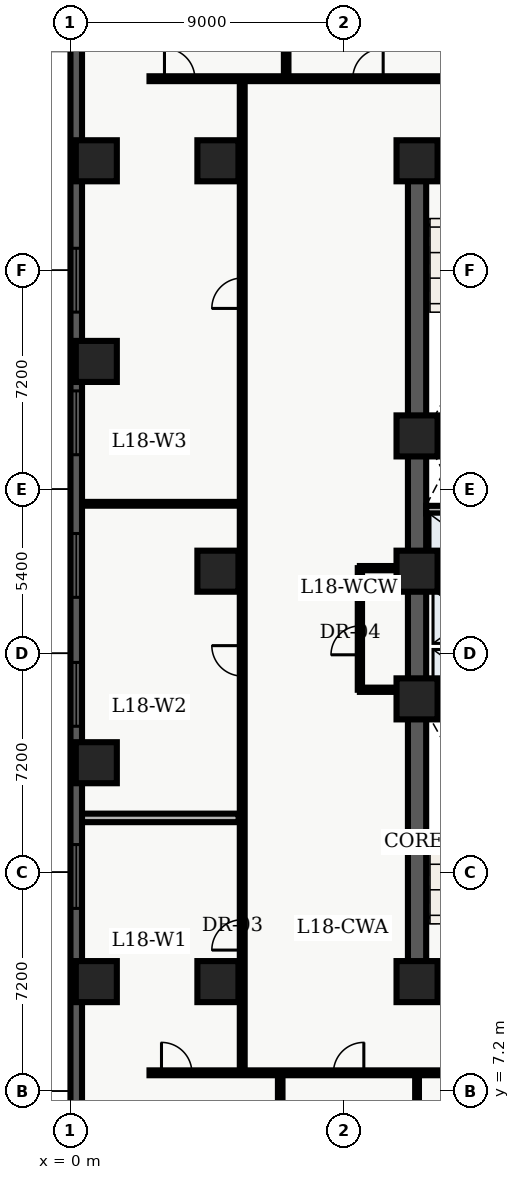
"""IFC4 building model, lengths in metres.
Left out: names, types, materials, properties, quantities, classifications, styles, units other than length and angle.
Written with IfcOpenShell. Run it as: python <this file> out.ifc"""

import sys

from ifc_helpers import new_model, entity, si_unit, converted_unit, direction, frame, origin_with_axes, origin_2d_with_axis, place, context, subcontext, project, spatial, polyline, rectangle, outline, extrude, element, fill, save


model = new_model("IFC4")
c1 = context("Model", 3, precision=1e-05, world=origin_with_axes(), true_north=direction((0.0, 1.0)))
c2 = subcontext(c1, "Body", "Model", "MODEL_VIEW")
j1 = project(units=[si_unit("LENGTHUNIT", "METRE"), converted_unit("PLANEANGLEUNIT", "DEGREE", entity("IfcPlaneAngleMeasure", 0.017), si_unit("PLANEANGLEUNIT", "RADIAN"), dimensions=[0, 0, 0, 0, 0, 0, 0])], contexts=[c1])
p1 = place(None, origin_with_axes())
s1 = spatial("IfcSite", under=j1, at=p1, CompositionType="ELEMENT")
p2 = place(p1, origin_with_axes())
s2 = spatial("IfcBuilding", under=s1, at=p2, CompositionType="ELEMENT")
p3 = place(p2, frame((0.0, 0.0, 75.6), z_axis=(0.0, 0.0, 1.0), x_axis=(1.0, 0.0, 0.0)))
s3 = spatial("IfcBuildingStorey", under=s2, at=p3, CompositionType="ELEMENT", Elevation=75.6)
p4 = place(p3, frame((11.4, 10.8, 0.0), z_axis=(0.0, 0.0, 1.0), x_axis=(0.0, 1.0, 0.0)))
e1 = element("IfcWall", 1, at=p4, inside=s3, PredefinedType="SHEAR", context=c2, shape_type="SweptSolid", body=[
    extrude(outline(polyline([(0.0, -0.3), (27.0, -0.3), (27.0, 0.3), (0.0, 0.3), (0.0, -0.3)])), origin_with_axes(), (0.0, 0.0, 1.0), 3.6),
])
p5 = place(p3, frame((11.4, 10.8, 0.0), z_axis=(0.0, 0.0, 1.0), x_axis=(1.0, 0.0, 0.0)))
e2 = element("IfcWall", 2, at=p5, inside=s3, PredefinedType="SHEAR", context=c2, shape_type="SweptSolid", body=[
    extrude(outline(polyline([(0.0, -0.3), (7.2, -0.3), (7.2, 0.3), (0.0, 0.3), (0.0, -0.3)])), origin_with_axes(), (0.0, 0.0, 1.0), 3.6),
])
p6 = place(p5, frame((2.625, 0.0, 0.0), z_axis=(0.0, 0.0, 1.0), x_axis=(1.0, 0.0, 0.0)))
e3 = element("IfcOpeningElement", 3, at=p6, cuts=e2, PredefinedType="OPENING", context=c2, shape_type="SweptSolid", body=[
    extrude(rectangle(XDim=1.05, YDim=0.62, at=origin_2d_with_axis()), origin_with_axes(), (0.0, 0.0, 1.0), 2.15),
])
p7 = place(p3, frame((11.4, 37.8, 0.0), z_axis=(0.0, 0.0, 1.0), x_axis=(1.0, 0.0, 0.0)))
e4 = element("IfcWall", 4, at=p7, inside=s3, PredefinedType="SHEAR", context=c2, shape_type="SweptSolid", body=[
    extrude(outline(polyline([(0.0, -0.3), (7.2, -0.3), (7.2, 0.3), (0.0, 0.3), (0.0, -0.3)])), origin_with_axes(), (0.0, 0.0, 1.0), 3.6),
])
p8 = place(p7, frame((2.625, 0.0, 0.0), z_axis=(0.0, 0.0, 1.0), x_axis=(1.0, 0.0, 0.0)))
e5 = element("IfcOpeningElement", 5, at=p8, cuts=e4, PredefinedType="OPENING", context=c2, shape_type="SweptSolid", body=[
    extrude(rectangle(XDim=1.05, YDim=0.62, at=origin_2d_with_axis()), origin_with_axes(), (0.0, 0.0, 1.0), 2.15),
])
for number, where, z_axis, x_axis in (
    (6, (11.7, 19.825, 0.0), (0.0, 0.0, 1.0), (1.0, 0.0, 0.0)),
    (7, (11.7, 28.775, 0.0), (0.0, 0.0, 1.0), (1.0, 0.0, 0.0)),
):
    element("IfcWall", number, at=place(p3, frame(where, z_axis=z_axis, x_axis=x_axis)), inside=s3, PredefinedType="SHEAR", context=c2, shape_type="SweptSolid", body=[
        extrude(outline(polyline([(0.0, -0.125), (6.6, -0.125), (6.6, 0.125), (0.0, 0.125), (0.0, -0.125)])), origin_with_axes(), (0.0, 0.0, 1.0), 3.6),
    ])
p9 = place(p3, frame((11.7, 24.1, 0.0), z_axis=(0.0, 0.0, 1.0), x_axis=(1.0, 0.0, 0.0)))
e8 = element("IfcWall", 8, at=p9, inside=s3, PredefinedType="SOLIDWALL", context=c2, shape_type="SweptSolid", body=[
    extrude(outline(polyline([(0.0, -0.125), (6.6, -0.125), (6.6, 0.125), (0.0, 0.125), (0.0, -0.125)])), origin_with_axes(), (0.0, 0.0, 1.0), 2.64),
])
p10 = place(p9, frame((3.6, 0.0, 0.0), z_axis=(0.0, 0.0, 1.0), x_axis=(1.0, 0.0, 0.0)))
e9 = element("IfcOpeningElement", 9, at=p10, cuts=e8, PredefinedType="OPENING", context=c2, shape_type="SweptSolid", body=[
    extrude(rectangle(XDim=0.9, YDim=0.27, at=origin_2d_with_axis()), origin_with_axes(), (0.0, 0.0, 1.0), 2.15),
])
p11 = place(p9, frame((5.65, 0.0, 0.0), z_axis=(0.0, 0.0, 1.0), x_axis=(1.0, 0.0, 0.0)))
e10 = element("IfcOpeningElement", 10, at=p11, cuts=e8, PredefinedType="OPENING", context=c2, shape_type="SweptSolid", body=[
    extrude(rectangle(XDim=0.9, YDim=0.27, at=origin_2d_with_axis()), origin_with_axes(), (0.0, 0.0, 1.0), 2.15),
])
p12 = place(p3, frame((11.7, 26.325, 0.0), z_axis=(0.0, 0.0, 1.0), x_axis=(1.0, 0.0, 0.0)))
e11 = element("IfcWall", 11, at=p12, inside=s3, PredefinedType="SOLIDWALL", context=c2, shape_type="SweptSolid", body=[
    extrude(outline(polyline([(0.0, -0.125), (6.6, -0.125), (6.6, 0.125), (0.0, 0.125), (0.0, -0.125)])), origin_with_axes(), (0.0, 0.0, 1.0), 2.64),
])
p13 = place(p12, frame((3.5, 0.0, 0.0), z_axis=(0.0, 0.0, 1.0), x_axis=(1.0, 0.0, 0.0)))
e12 = element("IfcOpeningElement", 12, at=p13, cuts=e11, PredefinedType="OPENING", context=c2, shape_type="SweptSolid", body=[
    extrude(rectangle(XDim=0.9, YDim=0.27, at=origin_2d_with_axis()), origin_with_axes(), (0.0, 0.0, 1.0), 2.15),
])
for number, where, z_axis, x_axis in (
    (13, (11.4, 10.8, 0.0), (0.0, 0.0, 1.0), (1.0, 0.0, 0.0)),
    (14, (11.4, 20.1, 0.0), (0.0, 0.0, 1.0), (1.0, 0.0, 0.0)),
    (15, (11.4, 24.3, 0.0), (0.0, 0.0, 1.0), (1.0, 0.0, 0.0)),
    (16, (11.4, 28.75, 0.0), (0.0, 0.0, 1.0), (1.0, 0.0, 0.0)),
    (17, (11.4, 37.8, 0.0), (0.0, 0.0, 1.0), (1.0, 0.0, 0.0)),
    (18, (4.85, 10.8, 0.0), (0.0, 0.0, 1.0), (1.0, 0.0, 0.0)),
    (19, (4.85, 24.3, 0.0), (0.0, 0.0, 1.0), (1.0, 0.0, 0.0)),
    (20, (4.85, 37.8, 0.0), (0.0, 0.0, 1.0), (1.0, 0.0, 0.0)),
    (21, (0.85, 10.8, 0.0), (0.0, 0.0, 1.0), (1.0, 0.0, 0.0)),
    (22, (0.85, 18.0, 0.0), (0.0, 0.0, 1.0), (1.0, 0.0, 0.0)),
    (23, (0.85, 31.2, 0.0), (0.0, 0.0, 1.0), (1.0, 0.0, 0.0)),
    (24, (0.85, 37.8, 0.0), (0.0, 0.0, 1.0), (1.0, 0.0, 0.0)),
):
    element("IfcColumn", number, at=place(p3, frame(where, z_axis=z_axis, x_axis=x_axis)), inside=s3, PredefinedType="COLUMN", context=c2, shape_type="SweptSolid", body=[
        extrude(rectangle(XDim=1.35, YDim=1.35, at=origin_2d_with_axis()), origin_with_axes(), (0.0, 0.0, 1.0), 3.9),
    ])
p14 = place(p3, frame((9.52, 20.4, 0.0), z_axis=(0.0, 0.0, 1.0), x_axis=(0.0, 1.0, 0.0)))
e25 = element("IfcWall", 25, at=p14, inside=s3, PredefinedType="PARTITIONING", context=c2, shape_type="SweptSolid", body=[
    extrude(outline(polyline([(0.0, -0.07), (4.0, -0.07), (4.0, 0.07), (0.0, 0.07), (0.0, -0.07)])), origin_with_axes(), (0.0, 0.0, 1.0), 2.64),
])
p15 = place(p14, frame((1.625, 0.0, 0.0), z_axis=(0.0, 0.0, 1.0), x_axis=(1.0, 0.0, 0.0)))
e26 = element("IfcOpeningElement", 26, at=p15, cuts=e25, PredefinedType="OPENING", context=c2, shape_type="SweptSolid", body=[
    extrude(rectangle(XDim=0.95, YDim=0.16, at=origin_2d_with_axis()), origin_with_axes(), (0.0, 0.0, 1.0), 2.15),
])
for number, where, z_axis, x_axis in (
    (27, (9.52, 20.4, 0.0), (0.0, 0.0, 1.0), (1.0, 0.0, 0.0)),
    (28, (9.52, 24.4, 0.0), (0.0, 0.0, 1.0), (1.0, 0.0, 0.0)),
):
    element("IfcWall", number, at=place(p3, frame(where, z_axis=z_axis, x_axis=x_axis)), inside=s3, PredefinedType="PARTITIONING", context=c2, shape_type="SweptSolid", body=[
        extrude(outline(polyline([(0.0, -0.07), (1.58, -0.07), (1.58, 0.07), (0.0, 0.07), (0.0, -0.07)])), origin_with_axes(), (0.0, 0.0, 1.0), 2.64),
    ])
p16 = place(p3, frame((2.6, 7.8, 0.0), z_axis=(0.0, 0.0, 1.0), x_axis=(1.0, 0.0, 0.0)))
e29 = element("IfcWall", 29, at=p16, inside=s3, PredefinedType="PARTITIONING", context=c2, shape_type="SweptSolid", body=[
    extrude(outline(polyline([(0.0, -0.08), (18.55, -0.08), (18.55, 0.08), (0.0, 0.08), (0.0, -0.08)])), origin_with_axes(), (0.0, 0.0, 1.0), 2.64),
])
p17 = place(p16, frame((0.894, 0.0, 0.0), z_axis=(0.0, 0.0, 1.0), x_axis=(1.0, 0.0, 0.0)))
e30 = element("IfcOpeningElement", 30, at=p17, cuts=e29, PredefinedType="OPENING", context=c2, shape_type="SweptSolid", body=[
    extrude(rectangle(XDim=1.0, YDim=0.18, at=origin_2d_with_axis()), origin_with_axes(), (0.0, 0.0, 1.0), 2.15),
])
p18 = place(p16, frame((6.55, 0.0, 0.0), z_axis=(0.0, 0.0, 1.0), x_axis=(1.0, 0.0, 0.0)))
e31 = element("IfcOpeningElement", 31, at=p18, cuts=e29, PredefinedType="OPENING", context=c2, shape_type="SweptSolid", body=[
    extrude(rectangle(XDim=1.0, YDim=0.18, at=origin_2d_with_axis()), origin_with_axes(), (0.0, 0.0, 1.0), 2.15),
])
p19 = place(p16, frame((11.932, 0.0, 0.0), z_axis=(0.0, 0.0, 1.0), x_axis=(1.0, 0.0, 0.0)))
e32 = element("IfcOpeningElement", 32, at=p19, cuts=e29, PredefinedType="OPENING", context=c2, shape_type="SweptSolid", body=[
    extrude(rectangle(XDim=1.0, YDim=0.18, at=origin_2d_with_axis()), origin_with_axes(), (0.0, 0.0, 1.0), 2.15),
])
p20 = place(p16, frame((16.502, 0.0, 0.0), z_axis=(0.0, 0.0, 1.0), x_axis=(1.0, 0.0, 0.0)))
e33 = element("IfcOpeningElement", 33, at=p20, cuts=e29, PredefinedType="OPENING", context=c2, shape_type="SweptSolid", body=[
    extrude(rectangle(XDim=1.0, YDim=0.18, at=origin_2d_with_axis()), origin_with_axes(), (0.0, 0.0, 1.0), 2.15),
])
p21 = place(p3, frame((2.6, 40.5, 0.0), z_axis=(0.0, 0.0, 1.0), x_axis=(1.0, 0.0, 0.0)))
e34 = element("IfcWall", 34, at=p21, inside=s3, PredefinedType="PARTITIONING", context=c2, shape_type="SweptSolid", body=[
    extrude(outline(polyline([(0.0, -0.08), (18.65, -0.08), (18.65, 0.08), (0.0, 0.08), (0.0, -0.08)])), origin_with_axes(), (0.0, 0.0, 1.0), 2.64),
])
p22 = place(p21, frame((0.992, 0.0, 0.0), z_axis=(0.0, 0.0, 1.0), x_axis=(1.0, 0.0, 0.0)))
e35 = element("IfcOpeningElement", 35, at=p22, cuts=e34, PredefinedType="OPENING", context=c2, shape_type="SweptSolid", body=[
    extrude(rectangle(XDim=1.0, YDim=0.18, at=origin_2d_with_axis()), origin_with_axes(), (0.0, 0.0, 1.0), 2.15),
])
p23 = place(p21, frame((7.186, 0.0, 0.0), z_axis=(0.0, 0.0, 1.0), x_axis=(1.0, 0.0, 0.0)))
e36 = element("IfcOpeningElement", 36, at=p23, cuts=e34, PredefinedType="OPENING", context=c2, shape_type="SweptSolid", body=[
    extrude(rectangle(XDim=1.0, YDim=0.18, at=origin_2d_with_axis()), origin_with_axes(), (0.0, 0.0, 1.0), 2.15),
])
p24 = place(p21, frame((13.148, 0.0, 0.0), z_axis=(0.0, 0.0, 1.0), x_axis=(1.0, 0.0, 0.0)))
e37 = element("IfcOpeningElement", 37, at=p24, cuts=e34, PredefinedType="OPENING", context=c2, shape_type="SweptSolid", body=[
    extrude(rectangle(XDim=1.0, YDim=0.18, at=origin_2d_with_axis()), origin_with_axes(), (0.0, 0.0, 1.0), 2.15),
])
p25 = place(p3, frame((5.65, 7.8, 0.0), z_axis=(0.0, 0.0, 1.0), x_axis=(0.0, 1.0, 0.0)))
e38 = element("IfcWall", 38, at=p25, inside=s3, PredefinedType="PARTITIONING", context=c2, shape_type="SweptSolid", body=[
    extrude(outline(polyline([(0.0, -0.08), (32.7, -0.08), (32.7, 0.08), (0.0, 0.08), (0.0, -0.08)])), origin_with_axes(), (0.0, 0.0, 1.0), 2.64),
])
p26 = place(p25, frame((4.537, 0.0, 0.0), z_axis=(0.0, 0.0, 1.0), x_axis=(1.0, 0.0, 0.0)))
e39 = element("IfcOpeningElement", 39, at=p26, cuts=e38, PredefinedType="OPENING", context=c2, shape_type="SweptSolid", body=[
    extrude(rectangle(XDim=1.0, YDim=0.18, at=origin_2d_with_axis()), origin_with_axes(), (0.0, 0.0, 1.0), 2.15),
])
p27 = place(p25, frame((13.551, 0.0, 0.0), z_axis=(0.0, 0.0, 1.0), x_axis=(1.0, 0.0, 0.0)))
e40 = element("IfcOpeningElement", 40, at=p27, cuts=e38, PredefinedType="OPENING", context=c2, shape_type="SweptSolid", body=[
    extrude(rectangle(XDim=1.0, YDim=0.18, at=origin_2d_with_axis()), origin_with_axes(), (0.0, 0.0, 1.0), 2.15),
])
p28 = place(p25, frame((25.643, 0.0, 0.0), z_axis=(0.0, 0.0, 1.0), x_axis=(1.0, 0.0, 0.0)))
e41 = element("IfcOpeningElement", 41, at=p28, cuts=e38, PredefinedType="OPENING", context=c2, shape_type="SweptSolid", body=[
    extrude(rectangle(XDim=1.0, YDim=0.18, at=origin_2d_with_axis()), origin_with_axes(), (0.0, 0.0, 1.0), 2.15),
])
p29 = place(p3, frame((0.375, 16.185, 0.0), z_axis=(0.0, 0.0, 1.0), x_axis=(1.0, 0.0, 0.0)))
e42 = element("IfcWall", 42, at=p29, inside=s3, PredefinedType="PARTITIONING", context=c2, shape_type="SweptSolid", body=[
    extrude(outline(polyline([(0.0, -0.14), (5.155, -0.14), (5.155, 0.14), (0.0, 0.14), (0.0, -0.14)])), origin_with_axes(), (0.0, 0.0, 1.0), 2.64),
])
p30 = place(p3, frame((0.375, 26.517, 0.0), z_axis=(0.0, 0.0, 1.0), x_axis=(1.0, 0.0, 0.0)))
e43 = element("IfcWall", 43, at=p30, inside=s3, PredefinedType="PARTITIONING", context=c2, shape_type="SweptSolid", body=[
    extrude(outline(polyline([(0.0, -0.062), (5.155, -0.062), (5.155, 0.062), (0.0, 0.062), (0.0, -0.062)])), origin_with_axes(), (0.0, 0.0, 1.0), 2.64),
])
p31 = place(p3, frame((6.899, 0.36, 0.0), z_axis=(0.0, 0.0, 1.0), x_axis=(0.0, 1.0, 0.0)))
e44 = element("IfcWall", 44, at=p31, inside=s3, PredefinedType="PARTITIONING", context=c2, shape_type="SweptSolid", body=[
    extrude(outline(polyline([(0.0, -0.075), (7.34, -0.075), (7.34, 0.075), (0.0, 0.075), (0.0, -0.075)])), origin_with_axes(), (0.0, 0.0, 1.0), 2.64),
])
p32 = place(p3, frame((11.4, 0.36, 0.0), z_axis=(0.0, 0.0, 1.0), x_axis=(0.0, 1.0, 0.0)))
e45 = element("IfcWall", 45, at=p32, inside=s3, PredefinedType="PARTITIONING", context=c2, shape_type="SweptSolid", body=[
    extrude(outline(polyline([(0.0, -0.062), (7.34, -0.062), (7.34, 0.062), (0.0, 0.062), (0.0, -0.062)])), origin_with_axes(), (0.0, 0.0, 1.0), 2.64),
])
p33 = place(p3, frame((7.095, 40.6, 0.0), z_axis=(0.0, 0.0, 1.0), x_axis=(0.0, 1.0, 0.0)))
e46 = element("IfcWall", 46, at=p33, inside=s3, PredefinedType="PARTITIONING", context=c2, shape_type="SweptSolid", body=[
    extrude(outline(polyline([(0.0, -0.075), (7.64, -0.075), (7.64, 0.075), (0.0, 0.075), (0.0, -0.075)])), origin_with_axes(), (0.0, 0.0, 1.0), 2.64),
])
p34 = place(p3, frame((0.19, 2.78, 0.0), z_axis=(0.0, 0.0, 1.0), x_axis=(0.0, 1.0, 0.0)))
e47 = element("IfcWall", 47, at=p34, inside=s3, PredefinedType="SOLIDWALL", context=c2, shape_type="SweptSolid", body=[
    extrude(outline(polyline([(0.0, -0.19), (43.42, -0.19), (43.42, 0.19), (0.0, 0.19), (0.0, -0.19)])), origin_with_axes(), (0.0, 0.0, 1.0), 3.6),
])
p35 = place(p34, frame((2.946, 0.0, 0.45), z_axis=(0.0, 0.0, 1.0), x_axis=(1.0, 0.0, 0.0)))
e48 = element("IfcOpeningElement", 48, at=p35, cuts=e47, PredefinedType="OPENING", context=c2, shape_type="SweptSolid", body=[
    extrude(rectangle(XDim=2.1, YDim=0.4, at=origin_2d_with_axis()), origin_with_axes(), (0.0, 0.0, 1.0), 2.2),
])
p36 = place(p34, frame((11.478, 0.0, 0.45), z_axis=(0.0, 0.0, 1.0), x_axis=(1.0, 0.0, 0.0)))
e49 = element("IfcOpeningElement", 49, at=p36, cuts=e47, PredefinedType="OPENING", context=c2, shape_type="SweptSolid", body=[
    extrude(rectangle(XDim=2.1, YDim=0.4, at=origin_2d_with_axis()), origin_with_axes(), (0.0, 0.0, 1.0), 2.2),
])
p37 = place(p34, frame((17.469, 0.0, 0.45), z_axis=(0.0, 0.0, 1.0), x_axis=(1.0, 0.0, 0.0)))
e50 = element("IfcOpeningElement", 50, at=p37, cuts=e47, PredefinedType="OPENING", context=c2, shape_type="SweptSolid", body=[
    extrude(rectangle(XDim=2.1, YDim=0.4, at=origin_2d_with_axis()), origin_with_axes(), (0.0, 0.0, 1.0), 2.2),
])
p38 = place(p34, frame((21.71, 0.0, 0.45), z_axis=(0.0, 0.0, 1.0), x_axis=(1.0, 0.0, 0.0)))
e51 = element("IfcOpeningElement", 51, at=p38, cuts=e47, PredefinedType="OPENING", context=c2, shape_type="SweptSolid", body=[
    extrude(rectangle(XDim=2.1, YDim=0.4, at=origin_2d_with_axis()), origin_with_axes(), (0.0, 0.0, 1.0), 2.2),
])
p39 = place(p34, frame((26.401, 0.0, 0.45), z_axis=(0.0, 0.0, 1.0), x_axis=(1.0, 0.0, 0.0)))
e52 = element("IfcOpeningElement", 52, at=p39, cuts=e47, PredefinedType="OPENING", context=c2, shape_type="SweptSolid", body=[
    extrude(rectangle(XDim=2.1, YDim=0.4, at=origin_2d_with_axis()), origin_with_axes(), (0.0, 0.0, 1.0), 2.2),
])
p40 = place(p34, frame((31.092, 0.0, 0.45), z_axis=(0.0, 0.0, 1.0), x_axis=(1.0, 0.0, 0.0)))
e53 = element("IfcOpeningElement", 53, at=p40, cuts=e47, PredefinedType="OPENING", context=c2, shape_type="SweptSolid", body=[
    extrude(rectangle(XDim=2.1, YDim=0.4, at=origin_2d_with_axis()), origin_with_axes(), (0.0, 0.0, 1.0), 2.2),
])
p41 = place(p34, frame((40.024, 0.0, 0.45), z_axis=(0.0, 0.0, 1.0), x_axis=(1.0, 0.0, 0.0)))
e54 = element("IfcOpeningElement", 54, at=p41, cuts=e47, PredefinedType="OPENING", context=c2, shape_type="SweptSolid", body=[
    extrude(rectangle(XDim=2.1, YDim=0.4, at=origin_2d_with_axis()), origin_with_axes(), (0.0, 0.0, 1.0), 2.2),
])
p42 = place(p14, frame((1.625, 0.0, 0.0), z_axis=(0.0, 0.0, 1.0), x_axis=(1.0, 0.0, 0.0)))
e55 = element("IfcDoor", 55, at=p42, inside=s3, OperationType="SINGLE_SWING_LEFT", PredefinedType="DOOR", context=c2, shape_type="SweptSolid", body=[
    extrude(rectangle(XDim=0.95, YDim=0.084, at=origin_2d_with_axis()), origin_with_axes(), (0.0, 0.0, 1.0), 2.15),
])
fill(e26, e55)
p43 = place(p25, frame((4.537, 0.0, 0.0), z_axis=(0.0, 0.0, 1.0), x_axis=(1.0, 0.0, 0.0)))
e56 = element("IfcDoor", 56, at=p43, inside=s3, OperationType="SINGLE_SWING_LEFT", PredefinedType="DOOR", context=c2, shape_type="SweptSolid", body=[
    extrude(rectangle(XDim=1.0, YDim=0.09, at=origin_2d_with_axis()), origin_with_axes(), (0.0, 0.0, 1.0), 2.15),
])
fill(e39, e56)
p44 = place(p25, frame((13.551, 0.0, 0.0), z_axis=(0.0, 0.0, 1.0), x_axis=(1.0, 0.0, 0.0)))
e57 = element("IfcDoor", 57, at=p44, inside=s3, OperationType="SINGLE_SWING_RIGHT", PredefinedType="DOOR", context=c2, shape_type="SweptSolid", body=[
    extrude(rectangle(XDim=1.0, YDim=0.09, at=origin_2d_with_axis()), origin_with_axes(), (0.0, 0.0, 1.0), 2.15),
])
fill(e40, e57)
p45 = place(p25, frame((25.643, 0.0, 0.0), z_axis=(0.0, 0.0, 1.0), x_axis=(1.0, 0.0, 0.0)))
e58 = element("IfcDoor", 58, at=p45, inside=s3, OperationType="SINGLE_SWING_LEFT", PredefinedType="DOOR", context=c2, shape_type="SweptSolid", body=[
    extrude(rectangle(XDim=1.0, YDim=0.09, at=origin_2d_with_axis()), origin_with_axes(), (0.0, 0.0, 1.0), 2.15),
])
fill(e41, e58)
p46 = place(p16, frame((0.894, 0.0, 0.0), z_axis=(0.0, 0.0, 1.0), x_axis=(1.0, 0.0, 0.0)))
e59 = element("IfcDoor", 59, at=p46, inside=s3, OperationType="SINGLE_SWING_LEFT", PredefinedType="DOOR", context=c2, shape_type="SweptSolid", body=[
    extrude(rectangle(XDim=1.0, YDim=0.09, at=origin_2d_with_axis()), origin_with_axes(), (0.0, 0.0, 1.0), 2.15),
])
fill(e30, e59)
p47 = place(p16, frame((6.55, 0.0, 0.0), z_axis=(0.0, 0.0, 1.0), x_axis=(1.0, 0.0, 0.0)))
e60 = element("IfcDoor", 60, at=p47, inside=s3, OperationType="SINGLE_SWING_RIGHT", PredefinedType="DOOR", context=c2, shape_type="SweptSolid", body=[
    extrude(rectangle(XDim=1.0, YDim=0.09, at=origin_2d_with_axis()), origin_with_axes(), (0.0, 0.0, 1.0), 2.15),
])
fill(e31, e60)
p48 = place(p21, frame((0.992, 0.0, 0.0), z_axis=(0.0, 0.0, 1.0), x_axis=(1.0, 0.0, 0.0)))
e61 = element("IfcDoor", 61, at=p48, inside=s3, OperationType="SINGLE_SWING_LEFT", PredefinedType="DOOR", context=c2, shape_type="SweptSolid", body=[
    extrude(rectangle(XDim=1.0, YDim=0.09, at=origin_2d_with_axis()), origin_with_axes(), (0.0, 0.0, 1.0), 2.15),
])
fill(e35, e61)
p49 = place(p21, frame((7.186, 0.0, 0.0), z_axis=(0.0, 0.0, 1.0), x_axis=(1.0, 0.0, 0.0)))
e62 = element("IfcDoor", 62, at=p49, inside=s3, OperationType="SINGLE_SWING_RIGHT", PredefinedType="DOOR", context=c2, shape_type="SweptSolid", body=[
    extrude(rectangle(XDim=1.0, YDim=0.09, at=origin_2d_with_axis()), origin_with_axes(), (0.0, 0.0, 1.0), 2.15),
])
fill(e36, e62)
p50 = place(p34, frame((11.478, 0.0, 0.45), z_axis=(0.0, 0.0, 1.0), x_axis=(1.0, 0.0, 0.0)))
e63 = element("IfcWindow", 63, at=p50, inside=s3, PredefinedType="WINDOW", context=c2, shape_type="SweptSolid", body=[
    extrude(rectangle(XDim=2.1, YDim=0.09, at=origin_2d_with_axis()), origin_with_axes(), (0.0, 0.0, 1.0), 2.2),
])
fill(e49, e63)
p51 = place(p34, frame((17.469, 0.0, 0.45), z_axis=(0.0, 0.0, 1.0), x_axis=(1.0, 0.0, 0.0)))
e64 = element("IfcWindow", 64, at=p51, inside=s3, PredefinedType="WINDOW", context=c2, shape_type="SweptSolid", body=[
    extrude(rectangle(XDim=2.1, YDim=0.09, at=origin_2d_with_axis()), origin_with_axes(), (0.0, 0.0, 1.0), 2.2),
])
fill(e50, e64)
p52 = place(p34, frame((21.71, 0.0, 0.45), z_axis=(0.0, 0.0, 1.0), x_axis=(1.0, 0.0, 0.0)))
e65 = element("IfcWindow", 65, at=p52, inside=s3, PredefinedType="WINDOW", context=c2, shape_type="SweptSolid", body=[
    extrude(rectangle(XDim=2.1, YDim=0.09, at=origin_2d_with_axis()), origin_with_axes(), (0.0, 0.0, 1.0), 2.2),
])
fill(e51, e65)
p53 = place(p34, frame((26.401, 0.0, 0.45), z_axis=(0.0, 0.0, 1.0), x_axis=(1.0, 0.0, 0.0)))
e66 = element("IfcWindow", 66, at=p53, inside=s3, PredefinedType="WINDOW", context=c2, shape_type="SweptSolid", body=[
    extrude(rectangle(XDim=2.1, YDim=0.09, at=origin_2d_with_axis()), origin_with_axes(), (0.0, 0.0, 1.0), 2.2),
])
fill(e52, e66)
p54 = place(p34, frame((31.092, 0.0, 0.45), z_axis=(0.0, 0.0, 1.0), x_axis=(1.0, 0.0, 0.0)))
e67 = element("IfcWindow", 67, at=p54, inside=s3, PredefinedType="WINDOW", context=c2, shape_type="SweptSolid", body=[
    extrude(rectangle(XDim=2.1, YDim=0.09, at=origin_2d_with_axis()), origin_with_axes(), (0.0, 0.0, 1.0), 2.2),
])
fill(e53, e67)
save(model, sys.argv[1])
